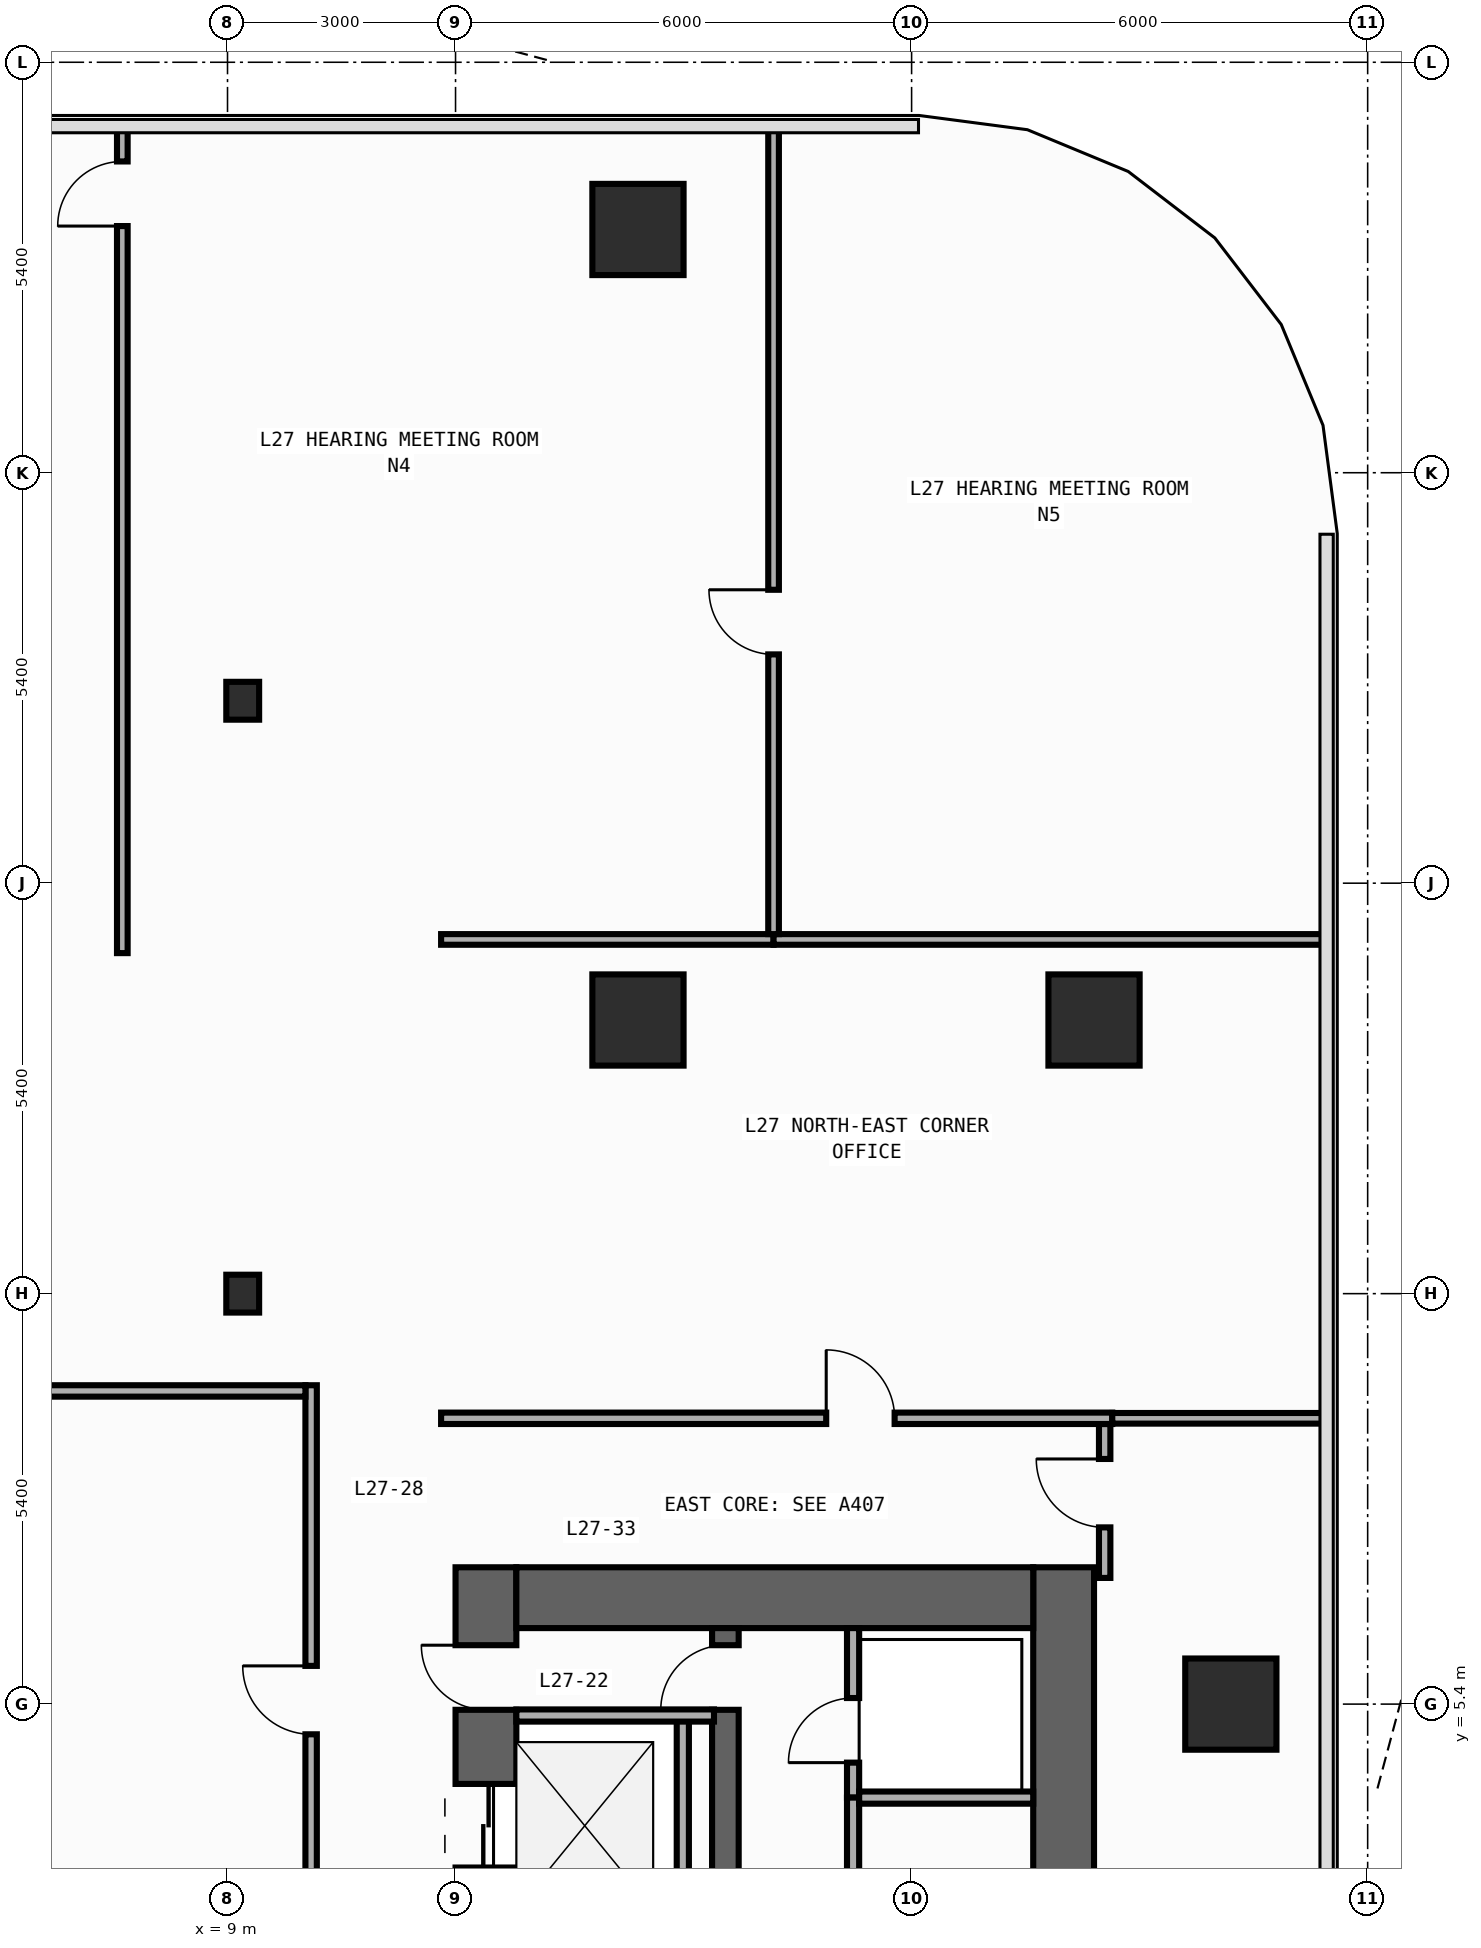
"""IFC4 building model, lengths in metres.
Left out: names, types, materials, properties, quantities, classifications, styles, units other than length and angle.
Written with IfcOpenShell. Run it as: python <this file> out.ifc"""

import sys

from ifc_helpers import new_model, si_unit, direction, frame, frame_2d, origin, origin_2d, place, context, subcontext, project, spatial, rectangle, i_section, extrude, element, fill, save


model = new_model("IFC4")
c1 = context("Model", 3, precision=1e-05, world=origin(), true_north=direction((0.0, 1.0)))
c2 = subcontext(c1, "Body", "Model", "MODEL_VIEW")
j1 = project(units=[si_unit("LENGTHUNIT", "METRE"), si_unit("PLANEANGLEUNIT", "RADIAN")], contexts=[c1])
p1 = place(None, origin())
s1 = spatial("IfcSite", under=j1, at=p1, CompositionType="ELEMENT")
p2 = place(p1, origin())
s2 = spatial("IfcBuilding", under=s1, at=p2, CompositionType="ELEMENT")
p3 = place(p2, frame((0.0, 0.0, 118.4)))
s3 = spatial("IfcBuildingStorey", under=s2, at=p3, CompositionType="ELEMENT", Elevation=118.4)
p4 = place(p3, frame((12.4, -19.8, 0.0), z_axis=(0.0, 0.0, 1.0), x_axis=(0.0, 1.0, 0.0)))
e1 = element("IfcWall", 1, at=p4, inside=s3, PredefinedType="SHEAR", context=c2, shape_type="SweptSolid", body=[
    extrude(rectangle(XDim=27.0, YDim=0.8, at=frame_2d((13.5, 0.0))), origin(), (0.0, 0.0, 1.0), 3.94),
])
p5 = place(p4, frame((23.05, 0.0, 0.0)))
e2 = element("IfcOpeningElement", 2, at=p5, cuts=e1, PredefinedType="OPENING", context=c2, shape_type="SweptSolid", body=[
    extrude(rectangle(XDim=1.1, YDim=2.2, at=frame_2d((0.55, 1.1))), frame((0.0, 0.41, 0.0), z_axis=(0.0, -1.0, 0.0), x_axis=(1.0, 0.0, 0.0)), (0.0, 0.0, 1.0), 0.82),
])
p6 = place(p4, frame((19.85, 0.0, 0.0)))
e3 = element("IfcOpeningElement", 3, at=p6, cuts=e1, PredefinedType="OPENING", context=c2, shape_type="SweptSolid", body=[
    extrude(rectangle(XDim=1.1, YDim=2.2, at=frame_2d((0.55, 1.1))), frame((0.0, 0.41, 0.0), z_axis=(0.0, -1.0, 0.0), x_axis=(1.0, 0.0, 0.0)), (0.0, 0.0, 1.0), 0.82),
])
p7 = place(p4, frame((16.65, 0.0, 0.0)))
e4 = element("IfcOpeningElement", 4, at=p7, cuts=e1, PredefinedType="OPENING", context=c2, shape_type="SweptSolid", body=[
    extrude(rectangle(XDim=1.1, YDim=2.2, at=frame_2d((0.55, 1.1))), frame((0.0, 0.41, 0.0), z_axis=(0.0, -1.0, 0.0), x_axis=(1.0, 0.0, 0.0)), (0.0, 0.0, 1.0), 0.82),
])
p8 = place(p4, frame((10.175, 0.0, 0.0)))
e5 = element("IfcOpeningElement", 5, at=p8, cuts=e1, PredefinedType="OPENING", context=c2, shape_type="SweptSolid", body=[
    extrude(rectangle(XDim=0.85, YDim=2.1, at=frame_2d((0.425, 1.05))), frame((0.0, 0.41, 0.0), z_axis=(0.0, -1.0, 0.0), x_axis=(1.0, 0.0, 0.0)), (0.0, 0.0, 1.0), 0.82),
])
p9 = place(p4, frame((12.725, 0.0, 0.0)))
e6 = element("IfcOpeningElement", 6, at=p9, cuts=e1, PredefinedType="OPENING", context=c2, shape_type="SweptSolid", body=[
    extrude(rectangle(XDim=1.15, YDim=2.2, at=frame_2d((0.575, 1.1))), frame((0.0, 0.41, 0.0), z_axis=(0.0, -1.0, 0.0), x_axis=(1.0, 0.0, 0.0)), (0.0, 0.0, 1.0), 0.82),
])
p10 = place(p4, frame((25.125, 0.0, 0.0)))
e7 = element("IfcOpeningElement", 7, at=p10, cuts=e1, PredefinedType="OPENING", context=c2, shape_type="SweptSolid", body=[
    extrude(rectangle(XDim=0.85, YDim=2.1, at=frame_2d((0.425, 1.05))), frame((0.0, 0.41, 0.0), z_axis=(0.0, -1.0, 0.0), x_axis=(1.0, 0.0, 0.0)), (0.0, 0.0, 1.0), 0.82),
])
p11 = place(p3, frame((20.0, -19.8, 0.0), z_axis=(0.0, 0.0, 1.0), x_axis=(0.0, 1.0, 0.0)))
e8 = element("IfcWall", 8, at=p11, inside=s3, PredefinedType="SHEAR", context=c2, shape_type="SweptSolid", body=[
    extrude(rectangle(XDim=27.0, YDim=0.8, at=frame_2d((13.5, 0.0))), origin(), (0.0, 0.0, 1.0), 3.94),
])
p12 = place(p3, frame((12.8, 6.8, 0.0), z_axis=(0.0, 0.0, 1.0), x_axis=(1.0, 0.0, 0.0)))
e9 = element("IfcWall", 9, at=p12, inside=s3, PredefinedType="SHEAR", context=c2, shape_type="SweptSolid", body=[
    extrude(rectangle(XDim=6.8, YDim=0.8, at=frame_2d((3.4, 0.0))), origin(), (0.0, 0.0, 1.0), 3.94),
])
p13 = place(p3, frame((15.55, -19.0, 0.0), z_axis=(0.0, 0.0, 1.0), x_axis=(0.0, 1.0, 0.0)))
e10 = element("IfcWall", 10, at=p13, inside=s3, PredefinedType="SHEAR", context=c2, shape_type="SweptSolid", body=[
    extrude(rectangle(XDim=25.4, YDim=0.35, at=frame_2d((12.7, 0.0))), origin(), (0.0, 0.0, 1.0), 3.94),
])
p14 = place(p13, frame((11.925, 0.0, 0.0)))
e11 = element("IfcOpeningElement", 11, at=p14, cuts=e10, PredefinedType="OPENING", context=c2, shape_type="SweptSolid", body=[
    extrude(rectangle(XDim=1.15, YDim=2.2, at=frame_2d((0.575, 1.1))), frame((0.0, 0.185, 0.0), z_axis=(0.0, -1.0, 0.0), x_axis=(1.0, 0.0, 0.0)), (0.0, 0.0, 1.0), 0.37),
])
p15 = place(p13, frame((24.325, 0.0, 0.0)))
e12 = element("IfcOpeningElement", 12, at=p15, cuts=e10, PredefinedType="OPENING", context=c2, shape_type="SweptSolid", body=[
    extrude(rectangle(XDim=0.85, YDim=2.1, at=frame_2d((0.425, 1.05))), frame((0.0, 0.185, 0.0), z_axis=(0.0, -1.0, 0.0), x_axis=(1.0, 0.0, 0.0)), (0.0, 0.0, 1.0), 0.37),
])
for number, where, z_axis, x_axis in (
    (13, (9.2, 10.8, 0.0), (0.0, 0.0, 1.0), (1.0, 0.0, 0.0)),
    (14, (9.2, 18.6, 0.0), (0.0, 0.0, 1.0), (1.0, 0.0, 0.0)),
):
    element("IfcColumn", number, at=place(p3, frame(where, z_axis=z_axis, x_axis=x_axis)), inside=s3, PredefinedType="COLUMN", context=c2, shape_type="SweptSolid", body=[
        extrude(i_section(OverallWidth=0.432, OverallDepth=0.498, WebThickness=0.045, FlangeThickness=0.07, FilletRadius=0.022, at=origin_2d()), origin(), (0.0, 0.0, 1.0), 4.2),
    ])
for number, where, z_axis, x_axis in (
    (15, (20.4, 14.4, 0.0), (0.0, 0.0, 1.0), (1.0, 0.0, 0.0)),
    (16, (14.4, 14.4, 0.0), (0.0, 0.0, 1.0), (1.0, 0.0, 0.0)),
    (17, (22.2, 5.4, 0.0), (0.0, 0.0, 1.0), (1.0, 0.0, 0.0)),
    (18, (14.4, 24.8, 0.0), (0.0, 0.0, 1.0), (1.0, 0.0, 0.0)),
):
    element("IfcColumn", number, at=place(p3, frame(where, z_axis=z_axis, x_axis=x_axis)), inside=s3, PredefinedType="COLUMN", context=c2, shape_type="SweptSolid", body=[
        extrude(rectangle(XDim=1.2, YDim=1.2, at=origin_2d()), origin(), (0.0, 0.0, 1.0), 4.2),
    ])
p16 = place(p3, frame((14.99, 2.4, 0.0), z_axis=(0.0, 0.0, 1.0), x_axis=(0.0, 1.0, 0.0)))
e19 = element("IfcWall", 19, at=p16, inside=s3, PredefinedType="STANDARD", context=c2, shape_type="SweptSolid", body=[
    extrude(rectangle(XDim=2.8, YDim=0.16, at=frame_2d((1.4, 0.0))), origin(), (0.0, 0.0, 1.0), 3.94),
])
p17 = place(p3, frame((12.8, 5.25, 0.0), z_axis=(0.0, 0.0, 1.0), x_axis=(1.0, 0.0, 0.0)))
e20 = element("IfcWall", 20, at=p17, inside=s3, PredefinedType="STANDARD", context=c2, shape_type="SweptSolid", body=[
    extrude(rectangle(XDim=2.6, YDim=0.16, at=frame_2d((1.3, 0.0))), origin(), (0.0, 0.0, 1.0), 3.94),
])
p18 = place(p3, frame((17.23, 4.17, 0.0), z_axis=(0.0, 0.0, 1.0), x_axis=(0.0, 1.0, 0.0)))
e21 = element("IfcWall", 21, at=p18, inside=s3, PredefinedType="PARTITIONING", context=c2, shape_type="SweptSolid", body=[
    extrude(rectangle(XDim=2.23, YDim=0.16, at=frame_2d((1.115, 0.0))), origin(), (0.0, 0.0, 1.0), 3.94),
])
p19 = place(p18, frame((0.46, 0.0, 0.0)))
e22 = element("IfcOpeningElement", 22, at=p19, cuts=e21, PredefinedType="OPENING", context=c2, shape_type="SweptSolid", body=[
    extrude(rectangle(XDim=0.85, YDim=2.1, at=frame_2d((0.425, 1.05))), frame((0.0, 0.09, 0.0), z_axis=(0.0, -1.0, 0.0), x_axis=(1.0, 0.0, 0.0)), (0.0, 0.0, 1.0), 0.18),
])
p20 = place(p3, frame((17.23, -1.14, 0.0), z_axis=(0.0, 0.0, 1.0), x_axis=(0.0, 1.0, 0.0)))
e23 = element("IfcWall", 23, at=p20, inside=s3, PredefinedType="PARTITIONING", context=c2, shape_type="SweptSolid", body=[
    extrude(rectangle(XDim=5.31, YDim=0.16, at=frame_2d((2.655, 0.0))), origin(), (0.0, 0.0, 1.0), 3.94),
])
p21 = place(p20, frame((3.375, 0.0, 0.0)))
e24 = element("IfcOpeningElement", 24, at=p21, cuts=e23, PredefinedType="OPENING", context=c2, shape_type="SweptSolid", body=[
    extrude(rectangle(XDim=0.85, YDim=2.1, at=frame_2d((0.425, 1.05))), frame((0.0, 0.09, 0.0), z_axis=(0.0, -1.0, 0.0), x_axis=(1.0, 0.0, 0.0)), (0.0, 0.0, 1.0), 0.18),
])
p22 = place(p3, frame((17.31, 4.17, 0.0), z_axis=(0.0, 0.0, 1.0), x_axis=(1.0, 0.0, 0.0)))
e25 = element("IfcWall", 25, at=p22, inside=s3, PredefinedType="PARTITIONING", context=c2, shape_type="SweptSolid", body=[
    extrude(rectangle(XDim=2.29, YDim=0.16, at=frame_2d((1.145, 0.0))), origin(), (0.0, 0.0, 1.0), 3.94),
])
p23 = place(p3, frame((10.1, -7.78, 0.0), z_axis=(0.0, 0.0, 1.0), x_axis=(0.0, 1.0, 0.0)))
e26 = element("IfcWall", 26, at=p23, inside=s3, PredefinedType="PARTITIONING", context=c2, shape_type="SweptSolid", body=[
    extrude(rectangle(XDim=17.375, YDim=0.15, at=frame_2d((8.688, 0.0))), origin(), (0.0, 0.0, 1.0), 3.94),
])
p24 = place(p23, frame((12.783, 0.0, 0.0)))
e27 = element("IfcOpeningElement", 27, at=p24, cuts=e26, PredefinedType="OPENING", context=c2, shape_type="SweptSolid", body=[
    extrude(rectangle(XDim=0.9, YDim=2.15, at=frame_2d((0.45, 1.075))), frame((0.0, 0.085, 0.0), z_axis=(0.0, -1.0, 0.0), x_axis=(1.0, 0.0, 0.0)), (0.0, 0.0, 1.0), 0.17),
])
p25 = place(p3, frame((-4.82, 9.52, 0.0), z_axis=(0.0, 0.0, 1.0), x_axis=(1.0, 0.0, 0.0)))
e28 = element("IfcWall", 28, at=p25, inside=s3, PredefinedType="PARTITIONING", context=c2, shape_type="SweptSolid", body=[
    extrude(rectangle(XDim=14.845, YDim=0.15, at=frame_2d((7.422, 0.0))), origin(), (0.0, 0.0, 1.0), 3.94),
])
p26 = place(p25, frame((3.866, 0.0, 0.0)))
e29 = element("IfcOpeningElement", 29, at=p26, cuts=e28, PredefinedType="OPENING", context=c2, shape_type="SweptSolid", body=[
    extrude(rectangle(XDim=0.9, YDim=2.15, at=frame_2d((0.45, 1.075))), frame((0.0, 0.085, 0.0), z_axis=(0.0, -1.0, 0.0), x_axis=(1.0, 0.0, 0.0)), (0.0, 0.0, 1.0), 0.17),
])
p27 = place(p3, frame((20.54, 7.06, 0.0), z_axis=(0.0, 0.0, 1.0), x_axis=(0.0, 1.0, 0.0)))
e30 = element("IfcWall", 30, at=p27, inside=s3, PredefinedType="PARTITIONING", context=c2, shape_type="SweptSolid", body=[
    extrude(rectangle(XDim=2.025, YDim=0.15, at=frame_2d((1.012, 0.0))), origin(), (0.0, 0.0, 1.0), 3.94),
])
p28 = place(p27, frame((0.665, 0.0, 0.0)))
e31 = element("IfcOpeningElement", 31, at=p28, cuts=e30, PredefinedType="OPENING", context=c2, shape_type="SweptSolid", body=[
    extrude(rectangle(XDim=0.9, YDim=2.15, at=frame_2d((0.45, 1.075))), frame((0.0, 0.085, 0.0), z_axis=(0.0, -1.0, 0.0), x_axis=(1.0, 0.0, 0.0)), (0.0, 0.0, 1.0), 0.17),
])
p29 = place(p3, frame((11.81, 9.16, 0.0), z_axis=(0.0, 0.0, 1.0), x_axis=(1.0, 0.0, 0.0)))
e32 = element("IfcWall", 32, at=p29, inside=s3, PredefinedType="PARTITIONING", context=c2, shape_type="SweptSolid", body=[
    extrude(rectangle(XDim=8.83, YDim=0.15, at=frame_2d((4.415, 0.0))), origin(), (0.0, 0.0, 1.0), 3.94),
])
p30 = place(p29, frame((5.067, 0.0, 0.0)))
e33 = element("IfcOpeningElement", 33, at=p30, cuts=e32, PredefinedType="OPENING", context=c2, shape_type="SweptSolid", body=[
    extrude(rectangle(XDim=0.9, YDim=2.15, at=frame_2d((0.45, 1.075))), frame((0.0, 0.085, 0.0), z_axis=(0.0, -1.0, 0.0), x_axis=(1.0, 0.0, 0.0)), (0.0, 0.0, 1.0), 0.17),
])
p31 = place(p3, frame((20.64, 9.16, 0.0), z_axis=(0.0, 0.0, 1.0), x_axis=(1.0, 0.0, 0.0)))
e34 = element("IfcWall", 34, at=p31, inside=s3, PredefinedType="PARTITIONING", context=c2, shape_type="SweptSolid", body=[
    extrude(rectangle(XDim=2.815, YDim=0.14, at=frame_2d((1.408, 0.0))), origin(), (0.0, 0.0, 1.0), 3.94),
])
p32 = place(p3, frame((11.81, 15.46, 0.0), z_axis=(0.0, 0.0, 1.0), x_axis=(1.0, 0.0, 0.0)))
e35 = element("IfcWall", 35, at=p32, inside=s3, PredefinedType="PARTITIONING", context=c2, shape_type="SweptSolid", body=[
    extrude(rectangle(XDim=4.374, YDim=0.14, at=frame_2d((2.187, 0.0))), origin(), (0.0, 0.0, 1.0), 3.94),
])
p33 = place(p3, frame((16.184, 15.46, 0.0), z_axis=(0.0, 0.0, 1.0), x_axis=(1.0, 0.0, 0.0)))
e36 = element("IfcWall", 36, at=p33, inside=s3, PredefinedType="PARTITIONING", context=c2, shape_type="SweptSolid", body=[
    extrude(rectangle(XDim=7.271, YDim=0.14, at=frame_2d((3.635, 0.0))), origin(), (0.0, 0.0, 1.0), 3.94),
])
p34 = place(p3, frame((7.616, 15.28, 0.0), z_axis=(0.0, 0.0, 1.0), x_axis=(0.0, 1.0, 0.0)))
e37 = element("IfcWall", 37, at=p34, inside=s3, PredefinedType="PARTITIONING", context=c2, shape_type="SweptSolid", body=[
    extrude(rectangle(XDim=10.875, YDim=0.14, at=frame_2d((5.438, 0.0))), origin(), (0.0, 0.0, 1.0), 3.94),
])
p35 = place(p34, frame((9.565, 0.0, 0.0)))
e38 = element("IfcOpeningElement", 38, at=p35, cuts=e37, PredefinedType="OPENING", context=c2, shape_type="SweptSolid", body=[
    extrude(rectangle(XDim=0.85, YDim=2.1, at=frame_2d((0.425, 1.05))), frame((0.0, 0.08, 0.0), z_axis=(0.0, -1.0, 0.0), x_axis=(1.0, 0.0, 0.0)), (0.0, 0.0, 1.0), 0.16),
])
p36 = place(p3, frame((16.184, 15.53, 0.0), z_axis=(0.0, 0.0, 1.0), x_axis=(0.0, 1.0, 0.0)))
e39 = element("IfcWall", 39, at=p36, inside=s3, PredefinedType="PARTITIONING", context=c2, shape_type="SweptSolid", body=[
    extrude(rectangle(XDim=10.625, YDim=0.14, at=frame_2d((5.312, 0.0))), origin(), (0.0, 0.0, 1.0), 3.94),
])
p37 = place(p36, frame((3.68, 0.0, 0.0)))
e40 = element("IfcOpeningElement", 40, at=p37, cuts=e39, PredefinedType="OPENING", context=c2, shape_type="SweptSolid", body=[
    extrude(rectangle(XDim=0.85, YDim=2.1, at=frame_2d((0.425, 1.05))), frame((0.0, 0.08, 0.0), z_axis=(0.0, -1.0, 0.0), x_axis=(1.0, 0.0, 0.0)), (0.0, 0.0, 1.0), 0.16),
])
p38 = place(p5, origin())
e41 = element("IfcDoor", 41, at=p38, inside=s3, OperationType="DOUBLE_DOOR_SLIDING", PredefinedType="DOOR", context=c2, shape_type="SweptSolid", body=[
    extrude(rectangle(XDim=1.1, YDim=2.2, at=frame_2d((0.55, 1.1))), frame((0.0, 0.025, 0.0), z_axis=(0.0, -1.0, 0.0), x_axis=(1.0, 0.0, 0.0)), (0.0, 0.0, 1.0), 0.05),
])
fill(e2, e41)
p39 = place(p10, origin())
e42 = element("IfcDoor", 42, at=p39, inside=s3, OperationType="SINGLE_SWING_RIGHT", PredefinedType="DOOR", context=c2, shape_type="SweptSolid", body=[
    extrude(rectangle(XDim=0.85, YDim=2.1, at=frame_2d((0.425, 1.05))), frame((0.0, 0.025, 0.0), z_axis=(0.0, -1.0, 0.0), x_axis=(1.0, 0.0, 0.0)), (0.0, 0.0, 1.0), 0.05),
])
fill(e7, e42)
p40 = place(p15, origin())
e43 = element("IfcDoor", 43, at=p40, inside=s3, OperationType="SINGLE_SWING_LEFT", PredefinedType="DOOR", context=c2, shape_type="SweptSolid", body=[
    extrude(rectangle(XDim=0.85, YDim=2.1, at=frame_2d((0.425, 1.05))), frame((0.0, 0.025, 0.0), z_axis=(0.0, -1.0, 0.0), x_axis=(1.0, 0.0, 0.0)), (0.0, 0.0, 1.0), 0.05),
])
fill(e12, e43)
p41 = place(p19, origin())
e44 = element("IfcDoor", 44, at=p41, inside=s3, OperationType="SINGLE_SWING_LEFT", PredefinedType="DOOR", context=c2, shape_type="SweptSolid", body=[
    extrude(rectangle(XDim=0.85, YDim=2.1, at=frame_2d((0.425, 1.05))), frame((0.0, 0.025, 0.0), z_axis=(0.0, -1.0, 0.0), x_axis=(1.0, 0.0, 0.0)), (0.0, 0.0, 1.0), 0.05),
])
fill(e22, e44)
p42 = place(p24, origin())
e45 = element("IfcDoor", 45, at=p42, inside=s3, OperationType="SINGLE_SWING_RIGHT", PredefinedType="DOOR", context=c2, shape_type="SweptSolid", body=[
    extrude(rectangle(XDim=0.9, YDim=2.15, at=frame_2d((0.45, 1.075))), frame((0.0, 0.025, 0.0), z_axis=(0.0, -1.0, 0.0), x_axis=(1.0, 0.0, 0.0)), (0.0, 0.0, 1.0), 0.05),
])
fill(e27, e45)
p43 = place(p28, origin())
e46 = element("IfcDoor", 46, at=p43, inside=s3, OperationType="SINGLE_SWING_RIGHT", PredefinedType="DOOR", context=c2, shape_type="SweptSolid", body=[
    extrude(rectangle(XDim=0.9, YDim=2.15, at=frame_2d((0.45, 1.075))), frame((0.0, 0.025, 0.0), z_axis=(0.0, -1.0, 0.0), x_axis=(1.0, 0.0, 0.0)), (0.0, 0.0, 1.0), 0.05),
])
fill(e31, e46)
p44 = place(p30, origin())
e47 = element("IfcDoor", 47, at=p44, inside=s3, OperationType="SINGLE_SWING_LEFT", PredefinedType="DOOR", context=c2, shape_type="SweptSolid", body=[
    extrude(rectangle(XDim=0.9, YDim=2.15, at=frame_2d((0.45, 1.075))), frame((0.0, 0.025, 0.0), z_axis=(0.0, -1.0, 0.0), x_axis=(1.0, 0.0, 0.0)), (0.0, 0.0, 1.0), 0.05),
])
fill(e33, e47)
p45 = place(p35, origin())
e48 = element("IfcDoor", 48, at=p45, inside=s3, OperationType="SINGLE_SWING_LEFT", PredefinedType="DOOR", context=c2, shape_type="SweptSolid", body=[
    extrude(rectangle(XDim=0.85, YDim=2.1, at=frame_2d((0.425, 1.05))), frame((0.0, 0.025, 0.0), z_axis=(0.0, -1.0, 0.0), x_axis=(1.0, 0.0, 0.0)), (0.0, 0.0, 1.0), 0.05),
])
fill(e38, e48)
p46 = place(p37, origin())
e49 = element("IfcDoor", 49, at=p46, inside=s3, OperationType="SINGLE_SWING_RIGHT", PredefinedType="DOOR", context=c2, shape_type="SweptSolid", body=[
    extrude(rectangle(XDim=0.85, YDim=2.1, at=frame_2d((0.425, 1.05))), frame((0.0, 0.025, 0.0), z_axis=(0.0, -1.0, 0.0), x_axis=(1.0, 0.0, 0.0)), (0.0, 0.0, 1.0), 0.05),
])
fill(e40, e49)
save(model, sys.argv[1])
